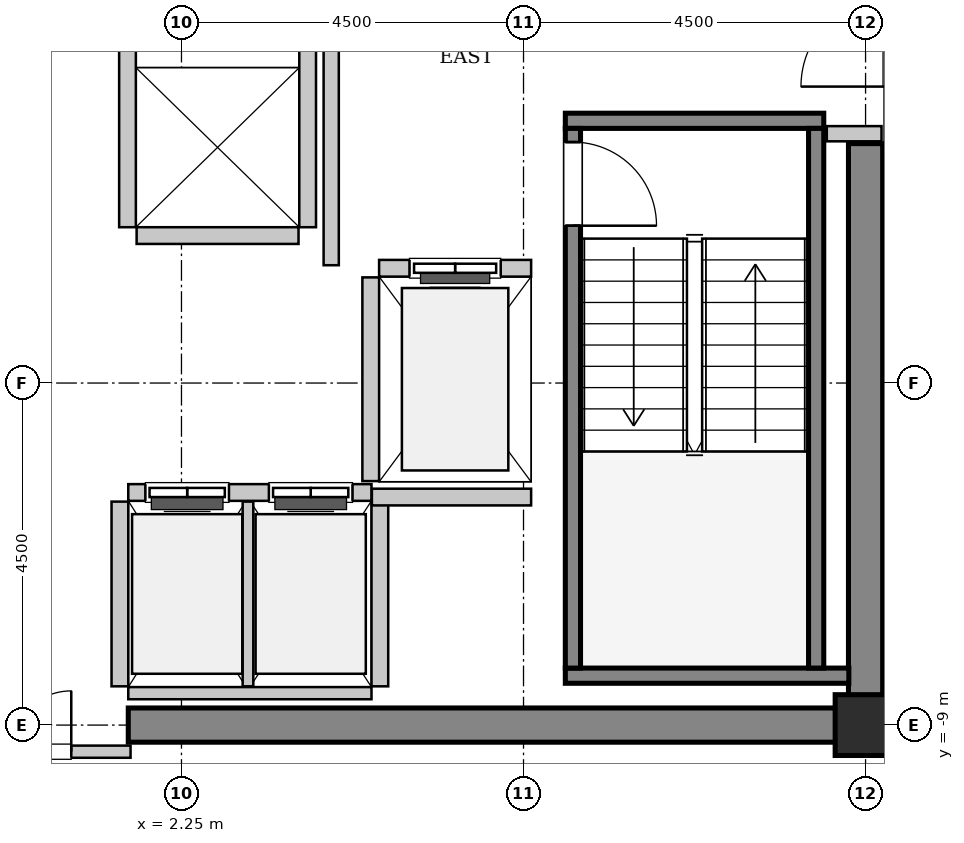
"""IFC4 building model, lengths in metres.
Left out: names, types, materials, properties, quantities, classifications, styles, units other than length and angle.
Written with IfcOpenShell. Run it as: python <this file> out.ifc"""

import sys

from ifc_helpers import new_model, si_unit, direction, frame, frame_2d, origin, origin_2d, place, context, subcontext, project, spatial, rectangle, hollow_rectangle, extrude, source, transform, mapped, element, fill, save


model = new_model("IFC4")
c1 = context("Model", 3, precision=1e-05, world=origin(), true_north=direction((0.0, 1.0)))
c2 = subcontext(c1, "Body", "Model", "MODEL_VIEW")
j1 = project(units=[si_unit("LENGTHUNIT", "METRE"), si_unit("PLANEANGLEUNIT", "RADIAN")], contexts=[c1])
p1 = place(None, origin())
s1 = spatial("IfcSite", under=j1, at=p1, CompositionType="ELEMENT")
p2 = place(p1, origin())
s2 = spatial("IfcBuilding", under=s1, at=p2, CompositionType="ELEMENT")
p3 = place(p2, frame((0.0, 0.0, 206.6)))
s3 = spatial("IfcBuildingStorey", under=s2, at=p3, CompositionType="ELEMENT", Elevation=206.6)
m1 = source(origin(), c2, "Body", "SweptSolid", [
    extrude(rectangle(XDim=9.925, YDim=0.45, at=frame_2d((4.962, 0.0))), origin(), (0.0, 0.0, 1.0), 3.8),
])
p4 = place(p3, frame((1.55, -9.0, 0.0), z_axis=(0.0, 0.0, 1.0), x_axis=(1.0, 0.0, 0.0)))
e1 = element("IfcWall", 1, at=p4, inside=s3, PredefinedType="SHEAR", context=c2, shape_type="MappedRepresentation", body=[
    mapped(m1, transform((0.0, 0.0, 0.0), x_axis=(1.0, 0.0, 0.0), y_axis=(0.0, 1.0, 0.0), z_axis=(0.0, 0.0, 1.0), scale=1.0)),
])
m2 = source(origin(), c2, "Body", "SweptSolid", [
    extrude(rectangle(XDim=7.425, YDim=0.45, at=frame_2d((3.712, 0.0))), origin(), (0.0, 0.0, 1.0), 3.8),
])
p5 = place(p3, frame((11.25, -8.775, 0.0), z_axis=(0.0, 0.0, 1.0), x_axis=(0.0, 1.0, 0.0)))
e2 = element("IfcWall", 2, at=p5, inside=s3, PredefinedType="SHEAR", context=c2, shape_type="MappedRepresentation", body=[
    mapped(m2, transform((0.0, 0.0, 0.0), x_axis=(1.0, 0.0, 0.0), y_axis=(0.0, 1.0, 0.0), z_axis=(0.0, 0.0, 1.0), scale=1.0)),
])
m3 = source(origin(), c2, "Body", "SweptSolid", [
    extrude(hollow_rectangle(XDim=0.8, YDim=0.8, WallThickness=0.04, InnerFilletRadius=0.04, OuterFilletRadius=0.08, at=origin_2d()), origin(), (0.0, 0.0, 1.0), 3.8),
])
p6 = place(p3, frame((11.25, -9.0, 0.0), z_axis=(0.0, 0.0, 1.0), x_axis=(1.0, 0.0, 0.0)))
e3 = element("IfcColumn", 3, at=p6, inside=s3, PredefinedType="COLUMN", context=c2, shape_type="MappedRepresentation", body=[
    mapped(m3, transform((0.0, 0.0, 0.0), x_axis=(1.0, 0.0, 0.0), y_axis=(0.0, 1.0, 0.0), z_axis=(0.0, 0.0, 1.0), scale=1.0)),
])
m4 = source(origin(), c2, "Body", "SweptSolid", [
    extrude(rectangle(XDim=3.4, YDim=0.2, at=frame_2d((1.7, 0.0))), origin(), (0.0, 0.0, 1.0), 3.8),
])
p7 = place(p3, frame((7.3, -1.05, 0.0), z_axis=(0.0, 0.0, 1.0), x_axis=(1.0, 0.0, 0.0)))
e4 = element("IfcWall", 4, at=p7, inside=s3, PredefinedType="SOLIDWALL", context=c2, shape_type="MappedRepresentation", body=[
    mapped(m4, transform((0.0, 0.0, 0.0), x_axis=(1.0, 0.0, 0.0), y_axis=(0.0, 1.0, 0.0), z_axis=(0.0, 0.0, 1.0), scale=1.0)),
])
m5 = source(origin(), c2, "Body", "SweptSolid", [
    extrude(rectangle(XDim=3.73, YDim=0.2, at=frame_2d((1.865, 0.0))), origin(), (0.0, 0.0, 1.0), 3.8),
])
p8 = place(p3, frame((7.3, -8.35, 0.0), z_axis=(0.0, 0.0, 1.0), x_axis=(1.0, 0.0, 0.0)))
e5 = element("IfcWall", 5, at=p8, inside=s3, PredefinedType="SOLIDWALL", context=c2, shape_type="MappedRepresentation", body=[
    mapped(m5, transform((0.0, 0.0, 0.0), x_axis=(1.0, 0.0, 0.0), y_axis=(0.0, 1.0, 0.0), z_axis=(0.0, 0.0, 1.0), scale=1.0)),
])
m6 = source(origin(), c2, "Body", "SweptSolid", [
    extrude(rectangle(XDim=7.1, YDim=0.2, at=frame_2d((3.55, 0.0))), origin(), (0.0, 0.0, 1.0), 3.8),
])
p9 = place(p3, frame((7.4, -1.15, 0.0), z_axis=(0.0, 0.0, 1.0), x_axis=(0.0, -1.0, 0.0)))
e6 = element("IfcWall", 6, at=p9, inside=s3, PredefinedType="SOLIDWALL", context=c2, shape_type="MappedRepresentation", body=[
    mapped(m6, transform((0.0, 0.0, 0.0), x_axis=(1.0, 0.0, 0.0), y_axis=(0.0, 1.0, 0.0), z_axis=(0.0, 0.0, 1.0), scale=1.0)),
])
p10 = place(p9, frame((0.18, 0.0, 0.0)))
e7 = element("IfcOpeningElement", 7, at=p10, cuts=e6, PredefinedType="OPENING", context=c2, shape_type="SweptSolid", body=[
    extrude(rectangle(XDim=1.1, YDim=2.15, at=frame_2d((0.55, 1.075))), frame((0.0, 0.11, 0.0), z_axis=(0.0, -1.0, 0.0), x_axis=(1.0, 0.0, 0.0)), (0.0, 0.0, 1.0), 0.22),
])
p11 = place(p3, frame((10.6, -1.15, 0.0), z_axis=(0.0, 0.0, 1.0), x_axis=(0.0, -1.0, 0.0)))
e8 = element("IfcWall", 8, at=p11, inside=s3, PredefinedType="SOLIDWALL", context=c2, shape_type="MappedRepresentation", body=[
    mapped(m6, transform((0.0, 0.0, 0.0), x_axis=(1.0, 0.0, 0.0), y_axis=(0.0, 1.0, 0.0), z_axis=(0.0, 0.0, 1.0), scale=1.0)),
])
m7 = source(origin(), c2, "Body", "SweptSolid", [
    extrude(rectangle(XDim=2.0, YDim=0.22, at=frame_2d((1.0, 0.0))), origin(), (0.0, 0.0, 1.0), 3.535),
])
p12 = place(p3, frame((6.85, -2.99, 0.0), z_axis=(0.0, 0.0, 1.0), x_axis=(-1.0, 0.0, 0.0)))
e9 = element("IfcWall", 9, at=p12, inside=s3, PredefinedType="SOLIDWALL", context=c2, shape_type="MappedRepresentation", body=[
    mapped(m7, transform((0.0, 0.0, 0.0), x_axis=(1.0, 0.0, 0.0), y_axis=(0.0, 1.0, 0.0), z_axis=(0.0, 0.0, 1.0), scale=1.0)),
])
p13 = place(p12, frame((0.4, 0.0, 0.0)))
e10 = element("IfcOpeningElement", 10, at=p13, cuts=e9, PredefinedType="OPENING", context=c2, shape_type="SweptSolid", body=[
    extrude(rectangle(XDim=1.2, YDim=2.2, at=frame_2d((0.6, 1.1))), frame((0.0, 0.12, 0.0), z_axis=(0.0, -1.0, 0.0), x_axis=(1.0, 0.0, 0.0)), (0.0, 0.0, 1.0), 0.24),
])
m8 = source(origin(), c2, "Body", "SweptSolid", [
    extrude(rectangle(XDim=2.68, YDim=0.22, at=frame_2d((1.34, 0.0))), origin(), (0.0, 0.0, 1.0), 3.535),
])
p14 = place(p3, frame((4.74, -3.11, 0.0), z_axis=(0.0, 0.0, 1.0), x_axis=(0.0, -1.0, 0.0)))
e11 = element("IfcWall", 11, at=p14, inside=s3, PredefinedType="SOLIDWALL", context=c2, shape_type="MappedRepresentation", body=[
    mapped(m8, transform((0.0, 0.0, 0.0), x_axis=(1.0, 0.0, 0.0), y_axis=(0.0, 1.0, 0.0), z_axis=(0.0, 0.0, 1.0), scale=1.0)),
])
m9 = source(origin(), c2, "Body", "SweptSolid", [
    extrude(rectangle(XDim=3.2, YDim=0.22, at=frame_2d((1.6, 0.0))), origin(), (0.0, 0.0, 1.0), 3.535),
])
p15 = place(p3, frame((4.75, -5.94, 0.0), z_axis=(0.0, 0.0, 1.0), x_axis=(-1.0, 0.0, 0.0)))
e12 = element("IfcWall", 12, at=p15, inside=s3, PredefinedType="SOLIDWALL", context=c2, shape_type="MappedRepresentation", body=[
    mapped(m9, transform((0.0, 0.0, 0.0), x_axis=(1.0, 0.0, 0.0), y_axis=(0.0, 1.0, 0.0), z_axis=(0.0, 0.0, 1.0), scale=1.0)),
])
p16 = place(p15, frame((1.875, 0.0, 0.0)))
e13 = element("IfcOpeningElement", 13, at=p16, cuts=e12, PredefinedType="OPENING", context=c2, shape_type="SweptSolid", body=[
    extrude(rectangle(XDim=1.1, YDim=2.2, at=frame_2d((0.55, 1.1))), frame((0.0, 0.12, 0.0), z_axis=(0.0, -1.0, 0.0), x_axis=(1.0, 0.0, 0.0)), (0.0, 0.0, 1.0), 0.24),
])
p17 = place(p15, frame((0.25, 0.0, 0.0)))
e14 = element("IfcOpeningElement", 14, at=p17, cuts=e12, PredefinedType="OPENING", context=c2, shape_type="SweptSolid", body=[
    extrude(rectangle(XDim=1.1, YDim=2.2, at=frame_2d((0.55, 1.1))), frame((0.0, 0.12, 0.0), z_axis=(0.0, -1.0, 0.0), x_axis=(1.0, 0.0, 0.0)), (0.0, 0.0, 1.0), 0.24),
])
m10 = source(origin(), c2, "Body", "SweptSolid", [
    extrude(rectangle(XDim=3.2, YDim=0.16, at=frame_2d((1.6, 0.0))), origin(), (0.0, 0.0, 1.0), 2.625),
])
p18 = place(p3, frame((1.55, -8.58, 0.0), z_axis=(0.0, 0.0, 1.0), x_axis=(1.0, 0.0, 0.0)))
e15 = element("IfcWall", 15, at=p18, inside=s3, PredefinedType="PARTITIONING", context=c2, shape_type="MappedRepresentation", body=[
    mapped(m10, transform((0.0, 0.0, 0.0), x_axis=(1.0, 0.0, 0.0), y_axis=(0.0, 1.0, 0.0), z_axis=(0.0, 0.0, 1.0), scale=1.0)),
])
m11 = source(origin(), c2, "Body", "SweptSolid", [
    extrude(rectangle(XDim=2.43, YDim=0.22, at=frame_2d((1.215, 0.0))), origin(), (0.0, 0.0, 1.0), 3.535),
])
p19 = place(p3, frame((1.44, -6.06, 0.0), z_axis=(0.0, 0.0, 1.0), x_axis=(0.0, -1.0, 0.0)))
e16 = element("IfcWall", 16, at=p19, inside=s3, PredefinedType="SOLIDWALL", context=c2, shape_type="MappedRepresentation", body=[
    mapped(m11, transform((0.0, 0.0, 0.0), x_axis=(1.0, 0.0, 0.0), y_axis=(0.0, 1.0, 0.0), z_axis=(0.0, 0.0, 1.0), scale=1.0)),
])
m12 = source(origin(), c2, "Body", "SweptSolid", [
    extrude(rectangle(XDim=2.43, YDim=0.14, at=frame_2d((1.215, 0.0))), origin(), (0.0, 0.0, 1.0), 3.535),
])
p20 = place(p3, frame((3.125, -8.49, 0.0), z_axis=(0.0, 0.0, 1.0), x_axis=(0.0, 1.0, 0.0)))
e17 = element("IfcWall", 17, at=p20, inside=s3, PredefinedType="PARTITIONING", context=c2, shape_type="MappedRepresentation", body=[
    mapped(m12, transform((0.0, 0.0, 0.0), x_axis=(1.0, 0.0, 0.0), y_axis=(0.0, 1.0, 0.0), z_axis=(0.0, 0.0, 1.0), scale=1.0)),
])
p21 = place(p3, frame((4.86, -8.49, 0.0), z_axis=(0.0, 0.0, 1.0), x_axis=(0.0, 1.0, 0.0)))
e18 = element("IfcWall", 18, at=p21, inside=s3, PredefinedType="SOLIDWALL", context=c2, shape_type="MappedRepresentation", body=[
    mapped(m11, transform((0.0, 0.0, 0.0), x_axis=(1.0, 0.0, 0.0), y_axis=(0.0, 1.0, 0.0), z_axis=(0.0, 0.0, 1.0), scale=1.0)),
])
m13 = source(origin(), c2, "Body", "SweptSolid", [
    extrude(rectangle(XDim=4.9, YDim=0.22, at=frame_2d((2.45, 0.0))), origin(), (0.0, 0.0, 1.0), 3.535),
])
for number, where, z_axis, x_axis in (
    (19, (1.54, 2.45, 0.0), (0.0, 0.0, 1.0), (0.0, -1.0, 0.0)),
    (20, (3.91, -2.45, 0.0), (0.0, 0.0, 1.0), (0.0, 1.0, 0.0)),
):
    element("IfcWall", number, at=place(p3, frame(where, z_axis=z_axis, x_axis=x_axis)), inside=s3, PredefinedType="SOLIDWALL", context=c2, shape_type="MappedRepresentation", body=[
        mapped(m13, transform((0.0, 0.0, 0.0), x_axis=(1.0, 0.0, 0.0), y_axis=(0.0, 1.0, 0.0), z_axis=(0.0, 0.0, 1.0), scale=1.0)),
    ])
m14 = source(origin(), c2, "Body", "SweptSolid", [
    extrude(rectangle(XDim=2.13, YDim=0.22, at=frame_2d((1.065, 0.0))), origin(), (0.0, 0.0, 1.0), 3.535),
])
p22 = place(p3, frame((1.66, -2.56, 0.0), z_axis=(0.0, 0.0, 1.0), x_axis=(1.0, 0.0, 0.0)))
e21 = element("IfcWall", 21, at=p22, inside=s3, PredefinedType="SOLIDWALL", context=c2, shape_type="MappedRepresentation", body=[
    mapped(m14, transform((0.0, 0.0, 0.0), x_axis=(1.0, 0.0, 0.0), y_axis=(0.0, 1.0, 0.0), z_axis=(0.0, 0.0, 1.0), scale=1.0)),
])
m15 = source(origin(), c2, "Body", "SweptSolid", [
    extrude(rectangle(XDim=2.095, YDim=0.22, at=frame_2d((1.048, 0.0))), origin(), (0.0, 0.0, 1.0), 3.535),
])
p23 = place(p3, frame((4.755, -6.0, 0.0), z_axis=(0.0, 0.0, 1.0), x_axis=(1.0, 0.0, 0.0)))
e22 = element("IfcWall", 22, at=p23, inside=s3, PredefinedType="SOLIDWALL", context=c2, shape_type="MappedRepresentation", body=[
    mapped(m15, transform((0.0, 0.0, 0.0), x_axis=(1.0, 0.0, 0.0), y_axis=(0.0, 1.0, 0.0), z_axis=(0.0, 0.0, 1.0), scale=1.0)),
])
m16 = source(origin(), c2, "Body", "SweptSolid", [
    extrude(rectangle(XDim=5.9, YDim=0.2, at=frame_2d((2.95, 0.0))), origin(), (0.0, 0.0, 1.0), 3.535),
])
p24 = place(p3, frame((4.22, -2.95, 0.0), z_axis=(0.0, 0.0, 1.0), x_axis=(0.0, 1.0, 0.0)))
e23 = element("IfcWall", 23, at=p24, inside=s3, PredefinedType="PARTITIONING", context=c2, shape_type="MappedRepresentation", body=[
    mapped(m16, transform((0.0, 0.0, 0.0), x_axis=(1.0, 0.0, 0.0), y_axis=(0.0, 1.0, 0.0), z_axis=(0.0, 0.0, 1.0), scale=1.0)),
])
m17 = source(origin(), c2, "Body", "SweptSolid", [
    extrude(rectangle(XDim=0.72, YDim=0.2, at=frame_2d((0.36, 0.0))), origin(), (0.0, 0.0, 1.0), 3.535),
])
p25 = place(p3, frame((10.74, -1.22, 0.0), z_axis=(0.0, 0.0, 1.0), x_axis=(1.0, 0.0, 0.0)))
e24 = element("IfcWall", 24, at=p25, inside=s3, PredefinedType="PARTITIONING", context=c2, shape_type="MappedRepresentation", body=[
    mapped(m17, transform((0.0, 0.0, 0.0), x_axis=(1.0, 0.0, 0.0), y_axis=(0.0, 1.0, 0.0), z_axis=(0.0, 0.0, 1.0), scale=1.0)),
])
m18 = source(origin(), c2, "Body", "SweptSolid", [
    extrude(rectangle(XDim=3.16, YDim=0.16, at=frame_2d((1.58, 0.0))), origin(), (0.0, 0.0, 1.0), 2.625),
])
p26 = place(p3, frame((-1.58, -9.35, 0.0), z_axis=(0.0, 0.0, 1.0), x_axis=(1.0, 0.0, 0.0)))
e25 = element("IfcWall", 25, at=p26, inside=s3, PredefinedType="PARTITIONING", context=c2, shape_type="MappedRepresentation", body=[
    mapped(m18, transform((0.0, 0.0, 0.0), x_axis=(1.0, 0.0, 0.0), y_axis=(0.0, 1.0, 0.0), z_axis=(0.0, 0.0, 1.0), scale=1.0)),
])
p27 = place(p26, frame((0.78, 0.0, 0.0)))
e26 = element("IfcOpeningElement", 26, at=p27, cuts=e25, PredefinedType="OPENING", context=c2, shape_type="SweptSolid", body=[
    extrude(rectangle(XDim=1.6, YDim=2.3, at=frame_2d((0.8, 1.15))), frame((0.0, 0.09, 0.0), z_axis=(0.0, -1.0, 0.0), x_axis=(1.0, 0.0, 0.0)), (0.0, 0.0, 1.0), 0.18),
])
m19 = source(origin(), c2, "Body", "SweptSolid", [
    extrude(rectangle(XDim=1.1, YDim=2.15, at=frame_2d((0.55, 1.075))), frame((0.0, 0.025, 0.0), z_axis=(0.0, -1.0, 0.0), x_axis=(1.0, 0.0, 0.0)), (0.0, 0.0, 1.0), 0.05),
])
p28 = place(p10, origin())
e27 = element("IfcDoor", 27, at=p28, inside=s3, OperationType="SINGLE_SWING_RIGHT", PredefinedType="DOOR", context=c2, shape_type="MappedRepresentation", body=[
    mapped(m19, transform((0.0, 0.0, 0.0), x_axis=(1.0, 0.0, 0.0), y_axis=(0.0, 1.0, 0.0), z_axis=(0.0, 0.0, 1.0), scale=1.0)),
])
fill(e7, e27)
m20 = source(origin(), c2, "Body", "SweptSolid", [
    extrude(rectangle(XDim=1.2, YDim=2.2, at=frame_2d((0.6, 1.1))), frame((0.0, 0.025, 0.0), z_axis=(0.0, -1.0, 0.0), x_axis=(1.0, 0.0, 0.0)), (0.0, 0.0, 1.0), 0.05),
])
p29 = place(p13, origin())
e28 = element("IfcDoor", 28, at=p29, inside=s3, OperationType="SLIDING_TO_LEFT", PredefinedType="DOOR", context=c2, shape_type="MappedRepresentation", body=[
    mapped(m20, transform((0.0, 0.0, 0.0), x_axis=(1.0, 0.0, 0.0), y_axis=(0.0, 1.0, 0.0), z_axis=(0.0, 0.0, 1.0), scale=1.0)),
])
fill(e10, e28)
m21 = source(origin(), c2, "Body", "SweptSolid", [
    extrude(rectangle(XDim=1.1, YDim=2.2, at=frame_2d((0.55, 1.1))), frame((0.0, 0.025, 0.0), z_axis=(0.0, -1.0, 0.0), x_axis=(1.0, 0.0, 0.0)), (0.0, 0.0, 1.0), 0.05),
])
p30 = place(p16, origin())
e29 = element("IfcDoor", 29, at=p30, inside=s3, OperationType="DOUBLE_DOOR_SLIDING", PredefinedType="DOOR", context=c2, shape_type="MappedRepresentation", body=[
    mapped(m21, transform((0.0, 0.0, 0.0), x_axis=(1.0, 0.0, 0.0), y_axis=(0.0, 1.0, 0.0), z_axis=(0.0, 0.0, 1.0), scale=1.0)),
])
fill(e13, e29)
p31 = place(p17, origin())
e30 = element("IfcDoor", 30, at=p31, inside=s3, OperationType="DOUBLE_DOOR_SLIDING", PredefinedType="DOOR", context=c2, shape_type="MappedRepresentation", body=[
    mapped(m21, transform((0.0, 0.0, 0.0), x_axis=(1.0, 0.0, 0.0), y_axis=(0.0, 1.0, 0.0), z_axis=(0.0, 0.0, 1.0), scale=1.0)),
])
fill(e14, e30)
m22 = source(origin(), c2, "Body", "SweptSolid", [
    extrude(rectangle(XDim=1.6, YDim=2.3, at=frame_2d((0.8, 1.15))), frame((0.0, 0.025, 0.0), z_axis=(0.0, -1.0, 0.0), x_axis=(1.0, 0.0, 0.0)), (0.0, 0.0, 1.0), 0.05),
])
p32 = place(p27, origin())
e31 = element("IfcDoor", 31, at=p32, inside=s3, OperationType="DOUBLE_DOOR_SINGLE_SWING", PredefinedType="DOOR", context=c2, shape_type="MappedRepresentation", body=[
    mapped(m22, transform((0.0, 0.0, 0.0), x_axis=(1.0, 0.0, 0.0), y_axis=(0.0, 1.0, 0.0), z_axis=(0.0, 0.0, 1.0), scale=1.0)),
])
fill(e26, e31)
save(model, sys.argv[1])
